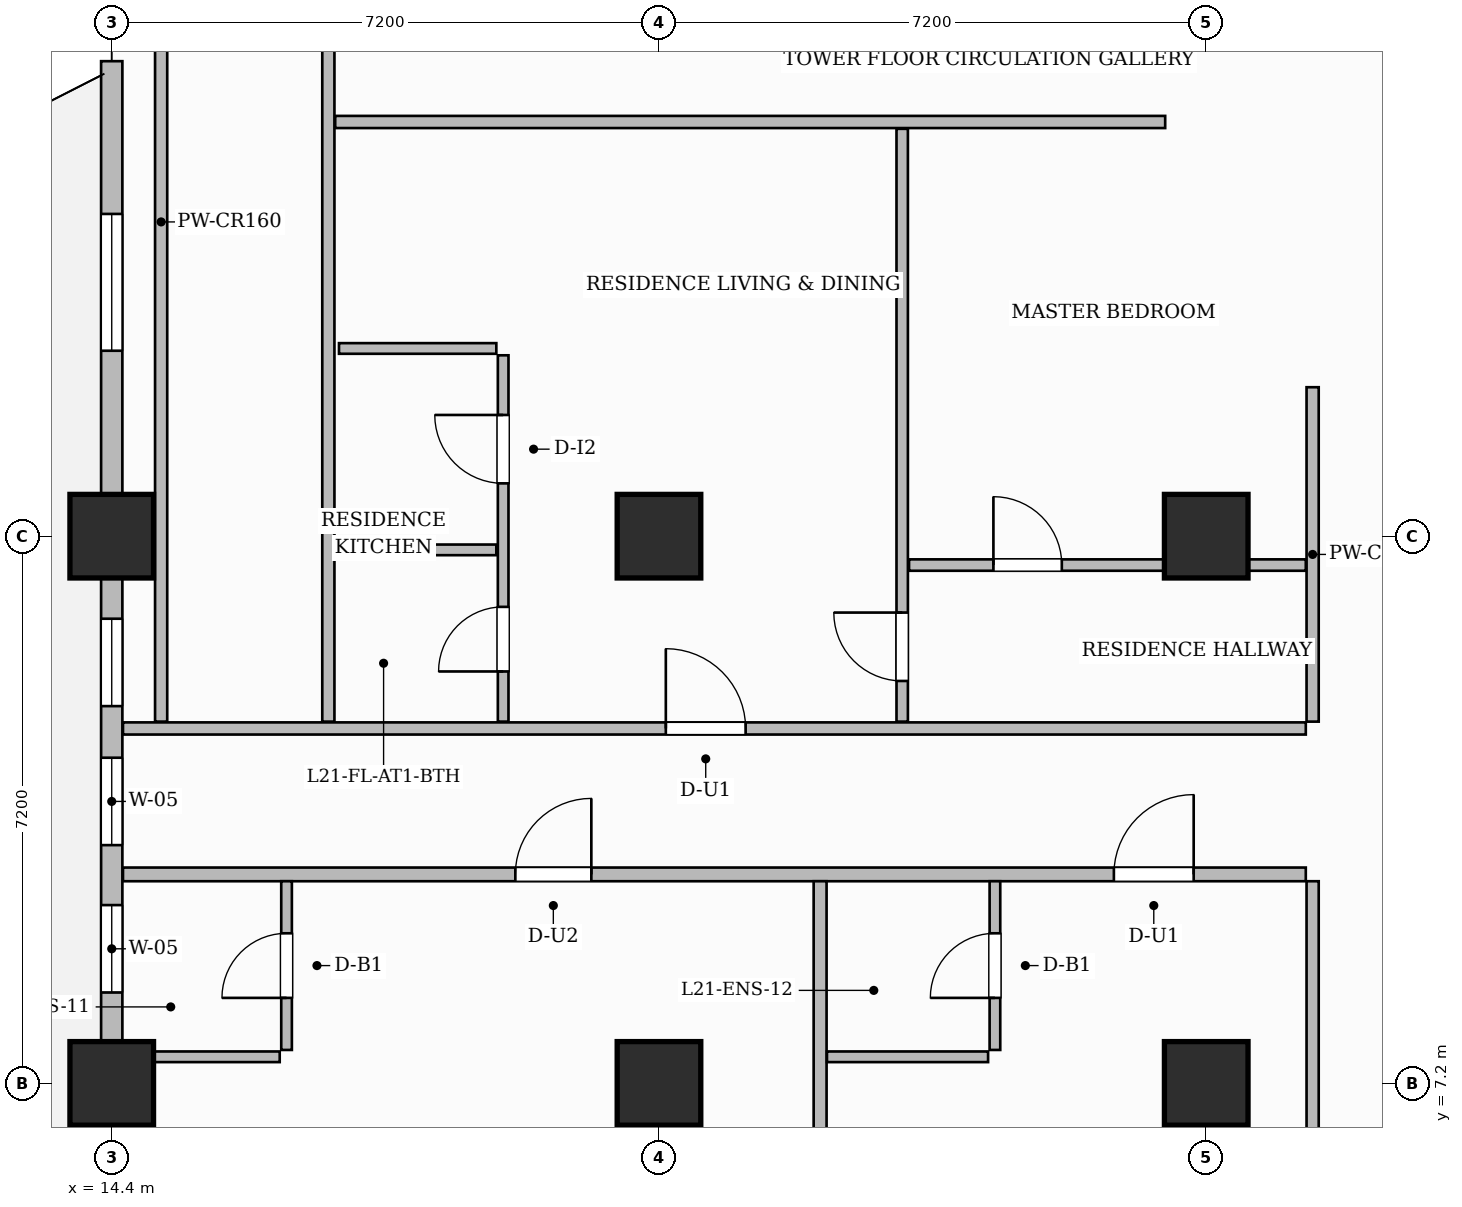
"""IFC4 building model, lengths in metres.
Left out: names, types, materials, properties, quantities, classifications, styles, units other than length and angle.
Written with IfcOpenShell. Run it as: python <this file> out.ifc"""

import sys

from ifc_helpers import new_model, si_unit, direction, frame, frame_2d, origin, origin_2d, place, context, subcontext, project, spatial, rectangle, extrude, source, transform, mapped, element, fill, save


model = new_model("IFC4")
c1 = context("Model", 3, precision=1e-05, world=origin(), true_north=direction((0.0, 1.0)))
c2 = subcontext(c1, "Body", "Model", "MODEL_VIEW")
j1 = project(units=[si_unit("LENGTHUNIT", "METRE"), si_unit("PLANEANGLEUNIT", "RADIAN")], contexts=[c1])
p1 = place(None, origin())
s1 = spatial("IfcSite", under=j1, at=p1, CompositionType="ELEMENT")
p2 = place(p1, origin())
s2 = spatial("IfcBuilding", under=s1, at=p2, CompositionType="ELEMENT")
p3 = place(p2, frame((0.0, 0.0, 87.9)))
s3 = spatial("IfcBuildingStorey", under=s2, at=p3, CompositionType="ELEMENT", Elevation=87.9)
m1 = source(origin(), c2, "Body", "SweptSolid", [
    extrude(rectangle(XDim=1.1, YDim=1.1, at=origin_2d()), origin(), (0.0, 0.0, 1.0), 3.7),
])
for number, where, z_axis, x_axis in (
    (1, (14.4, 7.2, 0.0), (0.0, 0.0, 1.0), (1.0, 0.0, 0.0)),
    (2, (14.4, 14.4, 0.0), (0.0, 0.0, 1.0), (1.0, 0.0, 0.0)),
    (3, (21.6, 7.2, 0.0), (0.0, 0.0, 1.0), (1.0, 0.0, 0.0)),
    (4, (21.6, 14.4, 0.0), (0.0, 0.0, 1.0), (1.0, 0.0, 0.0)),
    (5, (28.8, 7.2, 0.0), (0.0, 0.0, 1.0), (1.0, 0.0, 0.0)),
    (6, (28.8, 14.4, 0.0), (0.0, 0.0, 1.0), (1.0, 0.0, 0.0)),
):
    element("IfcColumn", number, at=place(p3, frame(where, z_axis=z_axis, x_axis=x_axis)), inside=s3, PredefinedType="COLUMN", context=c2, shape_type="MappedRepresentation", body=[
        mapped(m1, transform((0.0, 0.0, 0.0), scale=1.0)),
    ])
p4 = place(p3, frame((14.548, 9.95, 0.0), z_axis=(0.0, 0.0, 1.0), x_axis=(1.0, 0.0, 0.0)))
e7 = element("IfcWall", 7, at=p4, inside=s3, PredefinedType="PARTITIONING", context=c2, shape_type="SweptSolid", body=[
    extrude(rectangle(XDim=15.562, YDim=0.18, at=frame_2d((7.781, 0.0))), origin(), (0.0, 0.0, 1.0), 3.45),
])
p5 = place(p4, frame((5.162, 0.0, 0.0)))
e8 = element("IfcOpeningElement", 8, at=p5, cuts=e7, PredefinedType="OPENING", context=c2, shape_type="SweptSolid", body=[
    extrude(rectangle(XDim=1.0, YDim=2.2, at=frame_2d((0.5, 1.1))), frame((0.0, 0.1, 0.0), z_axis=(0.0, -1.0, 0.0), x_axis=(1.0, 0.0, 0.0)), (0.0, 0.0, 1.0), 0.2),
])
p6 = place(p4, frame((13.037, 0.0, 0.0)))
e9 = element("IfcOpeningElement", 9, at=p6, cuts=e7, PredefinedType="OPENING", context=c2, shape_type="SweptSolid", body=[
    extrude(rectangle(XDim=1.05, YDim=2.25, at=frame_2d((0.525, 1.125))), frame((0.0, 0.1, 0.0), z_axis=(0.0, -1.0, 0.0), x_axis=(1.0, 0.0, 0.0)), (0.0, 0.0, 1.0), 0.2),
])
p7 = place(p3, frame((14.548, 11.87, 0.0), z_axis=(0.0, 0.0, 1.0), x_axis=(1.0, 0.0, 0.0)))
e10 = element("IfcWall", 10, at=p7, inside=s3, PredefinedType="PARTITIONING", context=c2, shape_type="SweptSolid", body=[
    extrude(rectangle(XDim=15.562, YDim=0.16, at=frame_2d((7.781, 0.0))), origin(), (0.0, 0.0, 1.0), 3.45),
])
p8 = place(p7, frame((7.142, 0.0, 0.0)))
e11 = element("IfcOpeningElement", 11, at=p8, cuts=e10, PredefinedType="OPENING", context=c2, shape_type="SweptSolid", body=[
    extrude(rectangle(XDim=1.05, YDim=2.25, at=frame_2d((0.525, 1.125))), frame((0.0, 0.09, 0.0), z_axis=(0.0, -1.0, 0.0), x_axis=(1.0, 0.0, 0.0)), (0.0, 0.0, 1.0), 0.18),
])
p9 = place(p3, frame((30.2, 11.96, 0.0), z_axis=(0.0, 0.0, 1.0), x_axis=(0.0, 1.0, 0.0)))
e12 = element("IfcWall", 12, at=p9, inside=s3, PredefinedType="PARTITIONING", context=c2, shape_type="SweptSolid", body=[
    extrude(rectangle(XDim=4.4, YDim=0.16, at=frame_2d((2.2, 0.0))), origin(), (0.0, 0.0, 1.0), 3.45),
])
p10 = place(p3, frame((30.2, 0.148, 0.0), z_axis=(0.0, 0.0, 1.0), x_axis=(0.0, 1.0, 0.0)))
e13 = element("IfcWall", 13, at=p10, inside=s3, PredefinedType="PARTITIONING", context=c2, shape_type="SweptSolid", body=[
    extrude(rectangle(XDim=9.712, YDim=0.16, at=frame_2d((4.856, 0.0))), origin(), (0.0, 0.0, 1.0), 3.45),
])
p11 = place(p10, frame((1.977, 0.0, 0.0)))
e14 = element("IfcOpeningElement", 14, at=p11, cuts=e13, PredefinedType="OPENING", context=c2, shape_type="SweptSolid", body=[
    extrude(rectangle(XDim=1.05, YDim=2.15, at=frame_2d((0.525, 1.075))), frame((0.0, 0.09, 0.0), z_axis=(0.0, -1.0, 0.0), x_axis=(1.0, 0.0, 0.0)), (0.0, 0.0, 1.0), 0.18),
])
p12 = place(p3, frame((23.72, 0.148, 0.0), z_axis=(0.0, 0.0, 1.0), x_axis=(0.0, 1.0, 0.0)))
e15 = element("IfcWall", 15, at=p12, inside=s3, PredefinedType="PARTITIONING", context=c2, shape_type="SweptSolid", body=[
    extrude(rectangle(XDim=9.712, YDim=0.17, at=frame_2d((4.856, 0.0))), origin(), (0.0, 0.0, 1.0), 3.45),
])
p13 = place(p3, frame((16.7, 7.64, 0.0), z_axis=(0.0, 0.0, 1.0), x_axis=(0.0, 1.0, 0.0)))
e16 = element("IfcWall", 16, at=p13, inside=s3, PredefinedType="PARTITIONING", context=c2, shape_type="SweptSolid", body=[
    extrude(rectangle(XDim=2.22, YDim=0.14, at=frame_2d((1.11, 0.0))), origin(), (0.0, 0.0, 1.0), 3.45),
])
p14 = place(p13, frame((0.685, 0.0, 0.0)))
e17 = element("IfcOpeningElement", 17, at=p14, cuts=e16, PredefinedType="OPENING", context=c2, shape_type="SweptSolid", body=[
    extrude(rectangle(XDim=0.85, YDim=2.1, at=frame_2d((0.425, 1.05))), frame((0.0, 0.08, 0.0), z_axis=(0.0, -1.0, 0.0), x_axis=(1.0, 0.0, 0.0)), (0.0, 0.0, 1.0), 0.16),
])
p15 = place(p3, frame((14.49, 7.55, 0.0), z_axis=(0.0, 0.0, 1.0), x_axis=(1.0, 0.0, 0.0)))
e18 = element("IfcWall", 18, at=p15, inside=s3, PredefinedType="PARTITIONING", context=c2, shape_type="SweptSolid", body=[
    extrude(rectangle(XDim=2.12, YDim=0.14, at=frame_2d((1.06, 0.0))), origin(), (0.0, 0.0, 1.0), 3.45),
])
p16 = place(p3, frame((26.02, 7.64, 0.0), z_axis=(0.0, 0.0, 1.0), x_axis=(0.0, 1.0, 0.0)))
e19 = element("IfcWall", 19, at=p16, inside=s3, PredefinedType="PARTITIONING", context=c2, shape_type="SweptSolid", body=[
    extrude(rectangle(XDim=2.22, YDim=0.14, at=frame_2d((1.11, 0.0))), origin(), (0.0, 0.0, 1.0), 3.45),
])
p17 = place(p16, frame((0.685, 0.0, 0.0)))
e20 = element("IfcOpeningElement", 20, at=p17, cuts=e19, PredefinedType="OPENING", context=c2, shape_type="SweptSolid", body=[
    extrude(rectangle(XDim=0.85, YDim=2.1, at=frame_2d((0.425, 1.05))), frame((0.0, 0.08, 0.0), z_axis=(0.0, -1.0, 0.0), x_axis=(1.0, 0.0, 0.0)), (0.0, 0.0, 1.0), 0.16),
])
p18 = place(p3, frame((23.81, 7.55, 0.0), z_axis=(0.0, 0.0, 1.0), x_axis=(1.0, 0.0, 0.0)))
e21 = element("IfcWall", 21, at=p18, inside=s3, PredefinedType="PARTITIONING", context=c2, shape_type="SweptSolid", body=[
    extrude(rectangle(XDim=2.12, YDim=0.14, at=frame_2d((1.06, 0.0))), origin(), (0.0, 0.0, 1.0), 3.45),
])
for number, where, z_axis, x_axis in (
    (22, (15.05, 11.96, 0.0), (0.0, 0.0, 1.0), (0.0, 1.0, 0.0)),
    (23, (17.25, 11.96, 0.0), (0.0, 0.0, 1.0), (0.0, 1.0, 0.0)),
):
    element("IfcWall", number, at=place(p3, frame(where, z_axis=z_axis, x_axis=x_axis)), inside=s3, PredefinedType="PARTITIONING", context=c2, shape_type="SweptSolid", body=[
        extrude(rectangle(XDim=13.15, YDim=0.16, at=frame_2d((6.575, 0.0))), origin(), (0.0, 0.0, 1.0), 3.45),
    ])
p19 = place(p3, frame((17.34, 19.85, 0.0), z_axis=(0.0, 0.0, 1.0), x_axis=(1.0, 0.0, 0.0)))
e24 = element("IfcWall", 24, at=p19, inside=s3, PredefinedType="PARTITIONING", context=c2, shape_type="SweptSolid", body=[
    extrude(rectangle(XDim=10.92, YDim=0.16, at=frame_2d((5.46, 0.0))), origin(), (0.0, 0.0, 1.0), 3.45),
])
p20 = place(p3, frame((19.55, 11.96, 0.0), z_axis=(0.0, 0.0, 1.0), x_axis=(0.0, 1.0, 0.0)))
e25 = element("IfcWall", 25, at=p20, inside=s3, PredefinedType="PARTITIONING", context=c2, shape_type="SweptSolid", body=[
    extrude(rectangle(XDim=4.82, YDim=0.14, at=frame_2d((2.41, 0.0))), origin(), (0.0, 0.0, 1.0), 3.45),
])
p21 = place(p20, frame((0.66, 0.0, 0.0)))
e26 = element("IfcOpeningElement", 26, at=p21, cuts=e25, PredefinedType="OPENING", context=c2, shape_type="SweptSolid", body=[
    extrude(rectangle(XDim=0.85, YDim=2.1, at=frame_2d((0.425, 1.05))), frame((0.0, 0.08, 0.0), z_axis=(0.0, -1.0, 0.0), x_axis=(1.0, 0.0, 0.0)), (0.0, 0.0, 1.0), 0.16),
])
p22 = place(p20, frame((3.135, 0.0, 0.0)))
e27 = element("IfcOpeningElement", 27, at=p22, cuts=e25, PredefinedType="OPENING", context=c2, shape_type="SweptSolid", body=[
    extrude(rectangle(XDim=0.9, YDim=2.15, at=frame_2d((0.45, 1.075))), frame((0.0, 0.08, 0.0), z_axis=(0.0, -1.0, 0.0), x_axis=(1.0, 0.0, 0.0)), (0.0, 0.0, 1.0), 0.16),
])
p23 = place(p3, frame((17.39, 14.22, 0.0), z_axis=(0.0, 0.0, 1.0), x_axis=(1.0, 0.0, 0.0)))
e28 = element("IfcWall", 28, at=p23, inside=s3, PredefinedType="PARTITIONING", context=c2, shape_type="SweptSolid", body=[
    extrude(rectangle(XDim=2.07, YDim=0.14, at=frame_2d((1.035, 0.0))), origin(), (0.0, 0.0, 1.0), 2.885),
])
p24 = place(p3, frame((17.39, 16.87, 0.0), z_axis=(0.0, 0.0, 1.0), x_axis=(1.0, 0.0, 0.0)))
e29 = element("IfcWall", 29, at=p24, inside=s3, PredefinedType="PARTITIONING", context=c2, shape_type="SweptSolid", body=[
    extrude(rectangle(XDim=2.07, YDim=0.14, at=frame_2d((1.035, 0.0))), origin(), (0.0, 0.0, 1.0), 3.45),
])
p25 = place(p3, frame((24.8, 11.96, 0.0), z_axis=(0.0, 0.0, 1.0), x_axis=(0.0, 1.0, 0.0)))
e30 = element("IfcWall", 30, at=p25, inside=s3, PredefinedType="PARTITIONING", context=c2, shape_type="SweptSolid", body=[
    extrude(rectangle(XDim=7.8, YDim=0.15, at=frame_2d((3.9, 0.0))), origin(), (0.0, 0.0, 1.0), 3.45),
])
p26 = place(p25, frame((0.535, 0.0, 0.0)))
e31 = element("IfcOpeningElement", 31, at=p26, cuts=e30, PredefinedType="OPENING", context=c2, shape_type="SweptSolid", body=[
    extrude(rectangle(XDim=0.9, YDim=2.15, at=frame_2d((0.45, 1.075))), frame((0.0, 0.085, 0.0), z_axis=(0.0, -1.0, 0.0), x_axis=(1.0, 0.0, 0.0)), (0.0, 0.0, 1.0), 0.17),
])
p27 = place(p3, frame((24.89, 14.02, 0.0), z_axis=(0.0, 0.0, 1.0), x_axis=(1.0, 0.0, 0.0)))
e32 = element("IfcWall", 32, at=p27, inside=s3, PredefinedType="PARTITIONING", context=c2, shape_type="SweptSolid", body=[
    extrude(rectangle(XDim=5.22, YDim=0.15, at=frame_2d((2.61, 0.0))), origin(), (0.0, 0.0, 1.0), 3.45),
])
p28 = place(p27, frame((1.11, 0.0, 0.0)))
e33 = element("IfcOpeningElement", 33, at=p28, cuts=e32, PredefinedType="OPENING", context=c2, shape_type="SweptSolid", body=[
    extrude(rectangle(XDim=0.9, YDim=2.15, at=frame_2d((0.45, 1.075))), frame((0.0, 0.085, 0.0), z_axis=(0.0, -1.0, 0.0), x_axis=(1.0, 0.0, 0.0)), (0.0, 0.0, 1.0), 0.17),
])
p29 = place(p3, frame((14.4, 0.05, 0.0), z_axis=(0.0, 0.0, 1.0), x_axis=(0.0, 1.0, 0.0)))
e34 = element("IfcWall", 34, at=p29, inside=s3, PredefinedType="SOLIDWALL", context=c2, shape_type="SweptSolid", body=[
    extrude(rectangle(XDim=20.6, YDim=0.28, at=frame_2d((10.3, 0.0))), origin(), (0.0, 0.0, 1.0), 2.885),
])
p30 = place(p29, frame((2.75, 0.0, 0.0)))
e35 = element("IfcOpeningElement", 35, at=p30, cuts=e34, PredefinedType="OPENING", context=c2, shape_type="SweptSolid", body=[
    extrude(rectangle(XDim=1.2, YDim=2.2, at=frame_2d((0.6, 1.1))), frame((0.0, 0.15, 0.0), z_axis=(0.0, -1.0, 0.0), x_axis=(1.0, 0.0, 0.0)), (0.0, 0.0, 1.0), 0.3),
])
p31 = place(p29, frame((1.025, 0.0, 0.8)))
e36 = element("IfcOpeningElement", 36, at=p31, cuts=e34, PredefinedType="OPENING", context=c2, shape_type="SweptSolid", body=[
    extrude(rectangle(XDim=1.15, YDim=1.8, at=frame_2d((0.575, 0.9))), frame((0.0, 0.15, 0.0), z_axis=(0.0, -1.0, 0.0), x_axis=(1.0, 0.0, 0.0)), (0.0, 0.0, 1.0), 0.3),
])
p32 = place(p29, frame((4.6, 0.0, 0.8)))
e37 = element("IfcOpeningElement", 37, at=p32, cuts=e34, PredefinedType="OPENING", context=c2, shape_type="SweptSolid", body=[
    extrude(rectangle(XDim=1.4, YDim=1.85, at=frame_2d((0.7, 0.925))), frame((0.0, 0.15, 0.0), z_axis=(0.0, -1.0, 0.0), x_axis=(1.0, 0.0, 0.0)), (0.0, 0.0, 1.0), 0.3),
])
p33 = place(p29, frame((8.346, 0.0, 0.8)))
e38 = element("IfcOpeningElement", 38, at=p33, cuts=e34, PredefinedType="OPENING", context=c2, shape_type="SweptSolid", body=[
    extrude(rectangle(XDim=1.15, YDim=1.8, at=frame_2d((0.575, 0.9))), frame((0.0, 0.15, 0.0), z_axis=(0.0, -1.0, 0.0), x_axis=(1.0, 0.0, 0.0)), (0.0, 0.0, 1.0), 0.3),
])
p34 = place(p29, frame((10.285, 0.0, 0.8)))
e39 = element("IfcOpeningElement", 39, at=p34, cuts=e34, PredefinedType="OPENING", context=c2, shape_type="SweptSolid", body=[
    extrude(rectangle(XDim=1.15, YDim=1.8, at=frame_2d((0.575, 0.9))), frame((0.0, 0.15, 0.0), z_axis=(0.0, -1.0, 0.0), x_axis=(1.0, 0.0, 0.0)), (0.0, 0.0, 1.0), 0.3),
])
p35 = place(p29, frame((12.114, 0.0, 0.8)))
e40 = element("IfcOpeningElement", 40, at=p35, cuts=e34, PredefinedType="OPENING", context=c2, shape_type="SweptSolid", body=[
    extrude(rectangle(XDim=1.15, YDim=1.8, at=frame_2d((0.575, 0.9))), frame((0.0, 0.15, 0.0), z_axis=(0.0, -1.0, 0.0), x_axis=(1.0, 0.0, 0.0)), (0.0, 0.0, 1.0), 0.3),
])
p36 = place(p29, frame((16.79, 0.0, 0.8)))
e41 = element("IfcOpeningElement", 41, at=p36, cuts=e34, PredefinedType="OPENING", context=c2, shape_type="SweptSolid", body=[
    extrude(rectangle(XDim=1.8, YDim=1.85, at=frame_2d((0.9, 0.925))), frame((0.0, 0.15, 0.0), z_axis=(0.0, -1.0, 0.0), x_axis=(1.0, 0.0, 0.0)), (0.0, 0.0, 1.0), 0.3),
])
m2 = source(origin(), c2, "Body", "SweptSolid", [
    extrude(rectangle(XDim=0.85, YDim=2.1, at=frame_2d((0.425, 1.05))), frame((0.0, 0.025, 0.0), z_axis=(0.0, -1.0, 0.0), x_axis=(1.0, 0.0, 0.0)), (0.0, 0.0, 1.0), 0.05),
])
p37 = place(p14, origin())
e42 = element("IfcDoor", 42, at=p37, inside=s3, OperationType="SINGLE_SWING_LEFT", PredefinedType="DOOR", context=c2, shape_type="MappedRepresentation", body=[
    mapped(m2, transform((0.0, 0.0, 0.0), scale=1.0)),
])
fill(e17, e42)
m3 = source(origin(), c2, "Body", "SweptSolid", [
    extrude(rectangle(XDim=1.0, YDim=2.2, at=frame_2d((0.5, 1.1))), frame((0.0, 0.025, 0.0), z_axis=(0.0, -1.0, 0.0), x_axis=(1.0, 0.0, 0.0)), (0.0, 0.0, 1.0), 0.05),
])
p38 = place(p5, origin())
e43 = element("IfcDoor", 43, at=p38, inside=s3, OperationType="SINGLE_SWING_RIGHT", PredefinedType="DOOR", context=c2, shape_type="MappedRepresentation", body=[
    mapped(m3, transform((0.0, 0.0, 0.0), scale=1.0)),
])
fill(e8, e43)
p39 = place(p17, origin())
e44 = element("IfcDoor", 44, at=p39, inside=s3, OperationType="SINGLE_SWING_LEFT", PredefinedType="DOOR", context=c2, shape_type="MappedRepresentation", body=[
    mapped(m2, transform((0.0, 0.0, 0.0), scale=1.0)),
])
fill(e20, e44)
m4 = source(origin(), c2, "Body", "SweptSolid", [
    extrude(rectangle(XDim=1.05, YDim=2.25, at=frame_2d((0.525, 1.125))), frame((0.0, 0.025, 0.0), z_axis=(0.0, -1.0, 0.0), x_axis=(1.0, 0.0, 0.0)), (0.0, 0.0, 1.0), 0.05),
])
p40 = place(p6, origin())
e45 = element("IfcDoor", 45, at=p40, inside=s3, OperationType="SINGLE_SWING_RIGHT", PredefinedType="DOOR", context=c2, shape_type="MappedRepresentation", body=[
    mapped(m4, transform((0.0, 0.0, 0.0), scale=1.0)),
])
fill(e9, e45)
p41 = place(p21, origin())
e46 = element("IfcDoor", 46, at=p41, inside=s3, OperationType="SINGLE_SWING_LEFT", PredefinedType="DOOR", context=c2, shape_type="MappedRepresentation", body=[
    mapped(m2, transform((0.0, 0.0, 0.0), scale=1.0)),
])
fill(e26, e46)
m5 = source(origin(), c2, "Body", "SweptSolid", [
    extrude(rectangle(XDim=0.9, YDim=2.15, at=frame_2d((0.45, 1.075))), frame((0.0, 0.025, 0.0), z_axis=(0.0, -1.0, 0.0), x_axis=(1.0, 0.0, 0.0)), (0.0, 0.0, 1.0), 0.05),
])
p42 = place(p22, origin())
e47 = element("IfcDoor", 47, at=p42, inside=s3, OperationType="SINGLE_SWING_RIGHT", PredefinedType="DOOR", context=c2, shape_type="MappedRepresentation", body=[
    mapped(m5, transform((0.0, 0.0, 0.0), scale=1.0)),
])
fill(e27, e47)
p43 = place(p8, origin())
e48 = element("IfcDoor", 48, at=p43, inside=s3, OperationType="SINGLE_SWING_LEFT", PredefinedType="DOOR", context=c2, shape_type="MappedRepresentation", body=[
    mapped(m4, transform((0.0, 0.0, 0.0), scale=1.0)),
])
fill(e11, e48)
p44 = place(p26, origin())
e49 = element("IfcDoor", 49, at=p44, inside=s3, OperationType="SINGLE_SWING_RIGHT", PredefinedType="DOOR", context=c2, shape_type="MappedRepresentation", body=[
    mapped(m5, transform((0.0, 0.0, 0.0), scale=1.0)),
])
fill(e31, e49)
p45 = place(p28, origin())
e50 = element("IfcDoor", 50, at=p45, inside=s3, OperationType="SINGLE_SWING_LEFT", PredefinedType="DOOR", context=c2, shape_type="MappedRepresentation", body=[
    mapped(m5, transform((0.0, 0.0, 0.0), scale=1.0)),
])
fill(e33, e50)
m6 = source(origin(), c2, "Body", "SweptSolid", [
    extrude(rectangle(XDim=1.15, YDim=1.8, at=frame_2d((0.575, 0.9))), frame((0.0, 0.03, 0.0), z_axis=(0.0, -1.0, 0.0), x_axis=(1.0, 0.0, 0.0)), (0.0, 0.0, 1.0), 0.06),
])
p46 = place(p33, origin())
e51 = element("IfcWindow", 51, at=p46, inside=s3, PartitioningType="SINGLE_PANEL", PredefinedType="WINDOW", context=c2, shape_type="MappedRepresentation", body=[
    mapped(m6, transform((0.0, 0.0, 0.0), scale=1.0)),
])
fill(e38, e51)
p47 = place(p34, origin())
e52 = element("IfcWindow", 52, at=p47, inside=s3, PartitioningType="SINGLE_PANEL", PredefinedType="WINDOW", context=c2, shape_type="MappedRepresentation", body=[
    mapped(m6, transform((0.0, 0.0, 0.0), scale=1.0)),
])
fill(e39, e52)
p48 = place(p35, origin())
e53 = element("IfcWindow", 53, at=p48, inside=s3, PartitioningType="SINGLE_PANEL", PredefinedType="WINDOW", context=c2, shape_type="MappedRepresentation", body=[
    mapped(m6, transform((0.0, 0.0, 0.0), scale=1.0)),
])
fill(e40, e53)
m7 = source(origin(), c2, "Body", "SweptSolid", [
    extrude(rectangle(XDim=1.8, YDim=1.85, at=frame_2d((0.9, 0.925))), frame((0.0, 0.03, 0.0), z_axis=(0.0, -1.0, 0.0), x_axis=(1.0, 0.0, 0.0)), (0.0, 0.0, 1.0), 0.06),
])
p49 = place(p36, origin())
e54 = element("IfcWindow", 54, at=p49, inside=s3, PartitioningType="DOUBLE_PANEL_VERTICAL", PredefinedType="WINDOW", context=c2, shape_type="MappedRepresentation", body=[
    mapped(m7, transform((0.0, 0.0, 0.0), scale=1.0)),
])
fill(e41, e54)
save(model, sys.argv[1])
